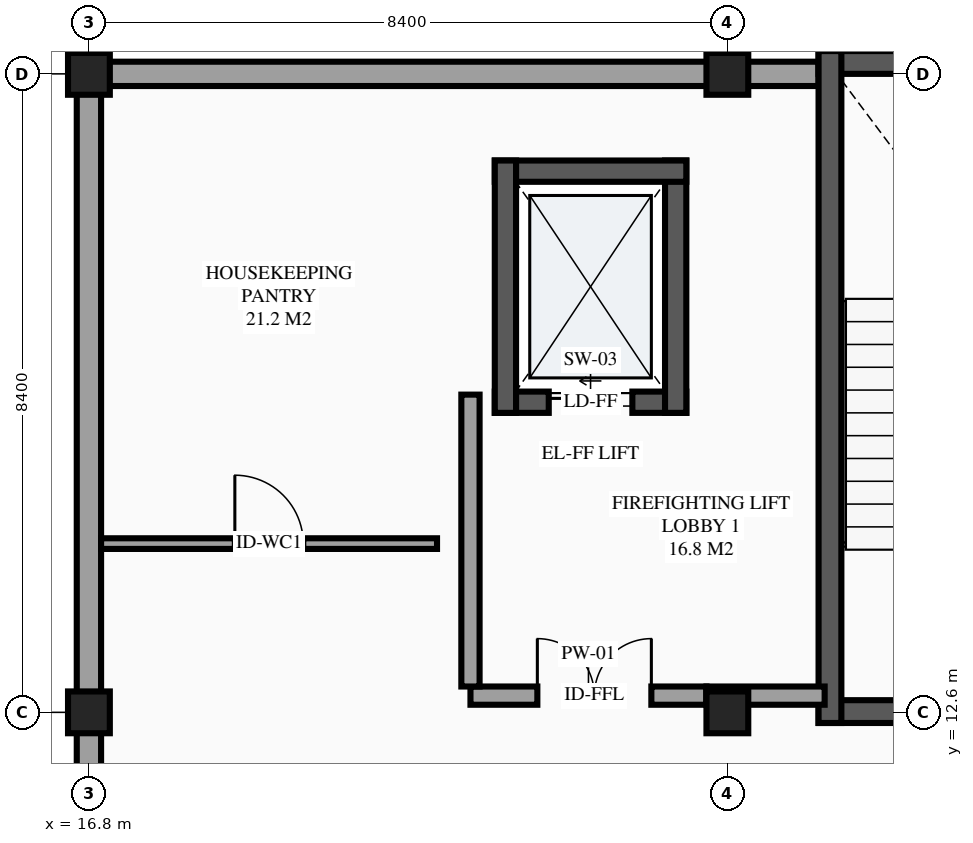
"""IFC4 building model, lengths in metres.
Left out: names, types, materials, properties, quantities, classifications, styles, units other than length and angle.
Written with IfcOpenShell. Run it as: python <this file> out.ifc"""

import sys

from ifc_helpers import new_model, si_unit, direction, frame, frame_2d, origin, origin_2d, place, context, subcontext, project, spatial, rectangle, extrude, element, fill, save


model = new_model("IFC4")
c1 = context("Model", 3, precision=1e-05, world=origin(), true_north=direction((0.0, 1.0)))
c2 = subcontext(c1, "Body", "Model", "MODEL_VIEW")
j1 = project(units=[si_unit("LENGTHUNIT", "METRE"), si_unit("PLANEANGLEUNIT", "RADIAN")], contexts=[c1])
p1 = place(None, origin())
s1 = spatial("IfcSite", under=j1, at=p1, CompositionType="ELEMENT")
p2 = place(p1, origin())
s2 = spatial("IfcBuilding", under=s1, at=p2, CompositionType="ELEMENT")
p3 = place(p2, frame((0.0, 0.0, 36.3)))
s3 = spatial("IfcBuildingStorey", under=s2, at=p3, CompositionType="ELEMENT", Elevation=36.3)
for number, where, z_axis, x_axis in (
    (1, (16.8, 12.6, 0.0), (0.0, 0.0, 1.0), (1.0, 0.0, 0.0)),
    (2, (16.8, 21.0, 0.0), (0.0, 0.0, 1.0), (1.0, 0.0, 0.0)),
    (3, (25.2, 12.6, 0.0), (0.0, 0.0, 1.0), (1.0, 0.0, 0.0)),
    (4, (25.2, 21.0, 0.0), (0.0, 0.0, 1.0), (1.0, 0.0, 0.0)),
):
    element("IfcColumn", number, at=place(p3, frame(where, z_axis=z_axis, x_axis=x_axis)), inside=s3, PredefinedType="COLUMN", context=c2, shape_type="SweptSolid", body=[
        extrude(rectangle(XDim=0.55, YDim=0.55, at=origin_2d()), origin(), (0.0, 0.0, 1.0), 3.6),
    ])
p4 = place(p3, frame((26.4, 21.0, 0.0), z_axis=(0.0, 0.0, 1.0), x_axis=(-1.0, 0.0, 0.0)))
e5 = element("IfcWall", 5, at=p4, inside=s3, PredefinedType="STANDARD", context=c2, shape_type="SweptSolid", body=[
    extrude(rectangle(XDim=9.6, YDim=0.32, at=frame_2d((4.8, 0.0))), origin(), (0.0, 0.0, 1.0), 2.48),
])
p5 = place(p3, frame((16.8, 21.0, 0.0), z_axis=(0.0, 0.0, 1.0), x_axis=(0.0, -1.0, 0.0)))
e6 = element("IfcWall", 6, at=p5, inside=s3, PredefinedType="STANDARD", context=c2, shape_type="SweptSolid", body=[
    extrude(rectangle(XDim=11.0, YDim=0.32, at=frame_2d((5.5, 0.0))), origin(), (0.0, 0.0, 1.0), 2.68),
])
p6 = place(p3, frame((22.14, 16.68, 0.0), z_axis=(0.0, 0.0, 1.0), x_axis=(1.0, 0.0, 0.0)))
e7 = element("IfcWall", 7, at=p6, inside=s3, PredefinedType="SHEAR", context=c2, shape_type="SweptSolid", body=[
    extrude(rectangle(XDim=2.52, YDim=0.28, at=frame_2d((1.26, 0.0))), origin(), (0.0, 0.0, 1.0), 3.6),
])
p7 = place(p6, frame((0.71, 0.0, 0.0)))
e8 = element("IfcOpeningElement", 8, at=p7, cuts=e7, PredefinedType="OPENING", context=c2, shape_type="SweptSolid", body=[
    extrude(rectangle(XDim=1.1, YDim=2.2, at=frame_2d((0.55, 1.1))), frame((0.0, 0.15, 0.0), z_axis=(0.0, -1.0, 0.0), x_axis=(1.0, 0.0, 0.0)), (0.0, 0.0, 1.0), 0.3),
])
p8 = place(p3, frame((24.52, 16.54, 0.0), z_axis=(0.0, 0.0, 1.0), x_axis=(0.0, 1.0, 0.0)))
e9 = element("IfcWall", 9, at=p8, inside=s3, PredefinedType="SHEAR", context=c2, shape_type="SweptSolid", body=[
    extrude(rectangle(XDim=3.32, YDim=0.28, at=frame_2d((1.66, 0.0))), origin(), (0.0, 0.0, 1.0), 3.6),
])
p9 = place(p3, frame((24.66, 19.72, 0.0), z_axis=(0.0, 0.0, 1.0), x_axis=(-1.0, 0.0, 0.0)))
e10 = element("IfcWall", 10, at=p9, inside=s3, PredefinedType="SHEAR", context=c2, shape_type="SweptSolid", body=[
    extrude(rectangle(XDim=2.52, YDim=0.28, at=frame_2d((1.26, 0.0))), origin(), (0.0, 0.0, 1.0), 3.6),
])
p10 = place(p3, frame((22.28, 19.86, 0.0), z_axis=(0.0, 0.0, 1.0), x_axis=(0.0, -1.0, 0.0)))
e11 = element("IfcWall", 11, at=p10, inside=s3, PredefinedType="SHEAR", context=c2, shape_type="SweptSolid", body=[
    extrude(rectangle(XDim=3.32, YDim=0.28, at=frame_2d((1.66, 0.0))), origin(), (0.0, 0.0, 1.0), 3.6),
])
p11 = place(p3, frame((26.4, 12.61, 0.0), z_axis=(0.0, 0.0, 1.0), x_axis=(1.0, 0.0, 0.0)))
e12 = element("IfcWall", 12, at=p11, inside=s3, PredefinedType="SHEAR", context=c2, shape_type="SweptSolid", body=[
    extrude(rectangle(XDim=5.2, YDim=0.3, at=frame_2d((2.6, 0.0))), origin(), (0.0, 0.0, 1.0), 3.6),
])
p12 = place(p11, frame((2.025, 0.0, 0.0)))
e13 = element("IfcOpeningElement", 13, at=p12, cuts=e12, PredefinedType="OPENING", context=c2, shape_type="SweptSolid", body=[
    extrude(rectangle(XDim=1.15, YDim=2.15, at=frame_2d((0.575, 1.075))), frame((0.0, 0.16, 0.0), z_axis=(0.0, -1.0, 0.0), x_axis=(1.0, 0.0, 0.0)), (0.0, 0.0, 1.0), 0.32),
])
p13 = place(p3, frame((31.6, 21.15, 0.0), z_axis=(0.0, 0.0, 1.0), x_axis=(-1.0, 0.0, 0.0)))
e14 = element("IfcWall", 14, at=p13, inside=s3, PredefinedType="SHEAR", context=c2, shape_type="SweptSolid", body=[
    extrude(rectangle(XDim=5.2, YDim=0.3, at=frame_2d((2.6, 0.0))), origin(), (0.0, 0.0, 1.0), 3.6),
])
p14 = place(p3, frame((26.55, 21.3, 0.0), z_axis=(0.0, 0.0, 1.0), x_axis=(0.0, -1.0, 0.0)))
e15 = element("IfcWall", 15, at=p14, inside=s3, PredefinedType="SHEAR", context=c2, shape_type="SweptSolid", body=[
    extrude(rectangle(XDim=8.84, YDim=0.3, at=frame_2d((4.42, 0.0))), origin(), (0.0, 0.0, 1.0), 3.6),
])
p15 = place(p3, frame((21.82, 12.82, 0.0), z_axis=(0.0, 0.0, 1.0), x_axis=(1.0, 0.0, 0.0)))
e16 = element("IfcWall", 16, at=p15, inside=s3, PredefinedType="PARTITIONING", context=c2, shape_type="SweptSolid", body=[
    extrude(rectangle(XDim=3.105, YDim=0.24, at=frame_2d((1.552, 0.0))), origin(), (0.0, 0.0, 1.0), 2.73),
])
p16 = place(p15, frame((0.88, 0.0, 0.0)))
e17 = element("IfcOpeningElement", 17, at=p16, cuts=e16, PredefinedType="OPENING", context=c2, shape_type="SweptSolid", body=[
    extrude(rectangle(XDim=1.5, YDim=2.15, at=frame_2d((0.75, 1.075))), frame((0.0, 0.13, 0.0), z_axis=(0.0, -1.0, 0.0), x_axis=(1.0, 0.0, 0.0)), (0.0, 0.0, 1.0), 0.26),
])
p17 = place(p3, frame((21.82, 12.94, 0.0), z_axis=(0.0, 0.0, 1.0), x_axis=(0.0, 1.0, 0.0)))
e18 = element("IfcWall", 18, at=p17, inside=s3, PredefinedType="PARTITIONING", context=c2, shape_type="SweptSolid", body=[
    extrude(rectangle(XDim=3.84, YDim=0.24, at=frame_2d((1.92, 0.0))), origin(), (0.0, 0.0, 1.0), 3.375),
])
p18 = place(p3, frame((16.96, 14.82, 0.0), z_axis=(0.0, 0.0, 1.0), x_axis=(1.0, 0.0, 0.0)))
e19 = element("IfcWall", 19, at=p18, inside=s3, PredefinedType="PARTITIONING", context=c2, shape_type="SweptSolid", body=[
    extrude(rectangle(XDim=4.42, YDim=0.14, at=frame_2d((2.21, 0.0))), origin(), (0.0, 0.0, 1.0), 3.375),
])
p19 = place(p18, frame((1.76, 0.0, 0.0)))
e20 = element("IfcOpeningElement", 20, at=p19, cuts=e19, PredefinedType="OPENING", context=c2, shape_type="SweptSolid", body=[
    extrude(rectangle(XDim=0.9, YDim=2.12, at=frame_2d((0.45, 1.06))), frame((0.0, 0.08, 0.0), z_axis=(0.0, -1.0, 0.0), x_axis=(1.0, 0.0, 0.0)), (0.0, 0.0, 1.0), 0.16),
])
p20 = place(p3, frame((24.925, 12.82, 0.0), z_axis=(0.0, 0.0, 1.0), x_axis=(1.0, 0.0, 0.0)))
e21 = element("IfcWall", 21, at=p20, inside=s3, PredefinedType="PARTITIONING", context=c2, shape_type="SweptSolid", body=[
    extrude(rectangle(XDim=1.555, YDim=0.24, at=frame_2d((0.777, 0.0))), origin(), (0.0, 0.0, 1.0), 3.375),
])
p21 = place(p7, origin())
e22 = element("IfcDoor", 22, at=p21, inside=s3, OperationType="SLIDING_TO_LEFT", PredefinedType="DOOR", context=c2, shape_type="SweptSolid", body=[
    extrude(rectangle(XDim=1.1, YDim=2.2, at=frame_2d((0.55, 1.1))), frame((0.0, 0.025, 0.0), z_axis=(0.0, -1.0, 0.0), x_axis=(1.0, 0.0, 0.0)), (0.0, 0.0, 1.0), 0.05),
])
fill(e8, e22)
p22 = place(p16, origin())
e23 = element("IfcDoor", 23, at=p22, inside=s3, OperationType="DOUBLE_DOOR_SINGLE_SWING", PredefinedType="DOOR", context=c2, shape_type="SweptSolid", body=[
    extrude(rectangle(XDim=1.5, YDim=2.15, at=frame_2d((0.75, 1.075))), frame((0.0, 0.025, 0.0), z_axis=(0.0, -1.0, 0.0), x_axis=(1.0, 0.0, 0.0)), (0.0, 0.0, 1.0), 0.05),
])
fill(e17, e23)
p23 = place(p19, origin())
e24 = element("IfcDoor", 24, at=p23, inside=s3, OperationType="SINGLE_SWING_LEFT", PredefinedType="DOOR", context=c2, shape_type="SweptSolid", body=[
    extrude(rectangle(XDim=0.9, YDim=2.12, at=frame_2d((0.45, 1.06))), frame((0.0, 0.025, 0.0), z_axis=(0.0, -1.0, 0.0), x_axis=(1.0, 0.0, 0.0)), (0.0, 0.0, 1.0), 0.05),
])
fill(e20, e24)
save(model, sys.argv[1])
